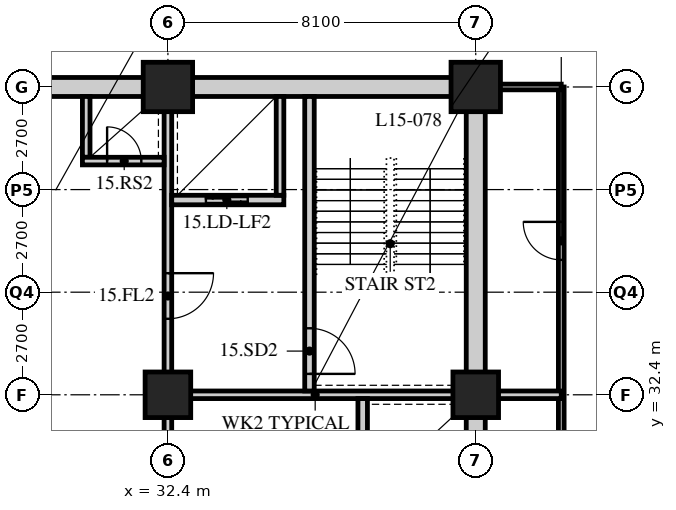
"""IFC4 building model, lengths in metres.
Left out: names, types, materials, properties, quantities, classifications, styles, units other than length and angle.
Written with IfcOpenShell. Run it as: python <this file> out.ifc"""

import sys

from ifc_helpers import new_model, si_unit, direction, frame, frame_2d, origin, origin_2d, place, context, subcontext, project, spatial, rectangle, hollow_rectangle, extrude, element, fill, save


model = new_model("IFC4")
c1 = context("Model", 3, precision=1e-05, world=origin(), true_north=direction((0.0, 1.0)))
c2 = subcontext(c1, "Body", "Model", "MODEL_VIEW")
j1 = project(units=[si_unit("LENGTHUNIT", "METRE"), si_unit("PLANEANGLEUNIT", "RADIAN")], contexts=[c1])
p1 = place(None, origin())
s1 = spatial("IfcSite", under=j1, at=p1, CompositionType="ELEMENT")
p2 = place(p1, origin())
s2 = spatial("IfcBuilding", under=s1, at=p2, CompositionType="ELEMENT")
p3 = place(p2, frame((0.0, 0.0, 63.6)))
s3 = spatial("IfcBuildingStorey", under=s2, at=p3, CompositionType="ELEMENT", Elevation=63.6)
p4 = place(p3, frame((32.4, 32.4, 0.0), z_axis=(0.0, 0.0, 1.0), x_axis=(1.0, 0.0, 0.0)))
e1 = element("IfcColumn", 1, at=p4, inside=s3, PredefinedType="COLUMN", context=c2, shape_type="SweptSolid", body=[
    extrude(hollow_rectangle(XDim=1.2, YDim=1.2, WallThickness=0.12, at=origin_2d()), origin(), (0.0, 0.0, 1.0), 3.4),
])
p5 = place(p3, frame((32.4, 40.5, 0.0), z_axis=(0.0, 0.0, 1.0), x_axis=(1.0, 0.0, 0.0)))
e2 = element("IfcColumn", 2, at=p5, inside=s3, PredefinedType="COLUMN", context=c2, shape_type="SweptSolid", body=[
    extrude(hollow_rectangle(XDim=1.3, YDim=1.3, WallThickness=0.13, at=origin_2d()), origin(), (0.0, 0.0, 1.0), 3.4),
])
p6 = place(p3, frame((40.5, 32.4, 0.0), z_axis=(0.0, 0.0, 1.0), x_axis=(1.0, 0.0, 0.0)))
e3 = element("IfcColumn", 3, at=p6, inside=s3, PredefinedType="COLUMN", context=c2, shape_type="SweptSolid", body=[
    extrude(hollow_rectangle(XDim=1.2, YDim=1.2, WallThickness=0.12, at=origin_2d()), origin(), (0.0, 0.0, 1.0), 3.4),
])
p7 = place(p3, frame((40.5, 40.5, 0.0), z_axis=(0.0, 0.0, 1.0), x_axis=(1.0, 0.0, 0.0)))
e4 = element("IfcColumn", 4, at=p7, inside=s3, PredefinedType="COLUMN", context=c2, shape_type="SweptSolid", body=[
    extrude(hollow_rectangle(XDim=1.3, YDim=1.3, WallThickness=0.13, at=origin_2d()), origin(), (0.0, 0.0, 1.0), 3.4),
])
p8 = place(p3, frame((42.75, 13.95, 0.0), z_axis=(0.0, 0.0, 1.0), x_axis=(0.0, 1.0, 0.0)))
e5 = element("IfcWall", 5, at=p8, inside=s3, PredefinedType="PARTITIONING", context=c2, shape_type="SweptSolid", body=[
    extrude(rectangle(XDim=26.55, YDim=0.15, at=frame_2d((13.275, 0.0))), origin(), (0.0, 0.0, 1.0), 3.19),
])
p9 = place(p8, frame((13.9, 0.0, 0.0)))
e6 = element("IfcOpeningElement", 6, at=p9, cuts=e5, PredefinedType="OPENING", context=c2, shape_type="SweptSolid", body=[
    extrude(rectangle(XDim=1.0, YDim=2.1, at=frame_2d((0.5, 1.05))), frame((0.0, 0.085, 0.0), z_axis=(0.0, -1.0, 0.0), x_axis=(1.0, 0.0, 0.0)), (0.0, 0.0, 1.0), 0.17),
])
p10 = place(p8, frame((22.0, 0.0, 0.0)))
e7 = element("IfcOpeningElement", 7, at=p10, cuts=e5, PredefinedType="OPENING", context=c2, shape_type="SweptSolid", body=[
    extrude(rectangle(XDim=1.0, YDim=2.1, at=frame_2d((0.5, 1.05))), frame((0.0, 0.085, 0.0), z_axis=(0.0, -1.0, 0.0), x_axis=(1.0, 0.0, 0.0)), (0.0, 0.0, 1.0), 0.17),
])
p11 = place(p3, frame((42.75, 40.5, 0.0), z_axis=(0.0, 0.0, 1.0), x_axis=(-1.0, 0.0, 0.0)))
e8 = element("IfcWall", 8, at=p11, inside=s3, PredefinedType="PARTITIONING", context=c2, shape_type="SweptSolid", body=[
    extrude(rectangle(XDim=2.05, YDim=0.15, at=frame_2d((1.025, 0.0))), origin(), (0.0, 0.0, 1.0), 2.578),
])
p12 = place(p3, frame((40.5, 32.4, 0.0), z_axis=(0.0, 0.0, 1.0), x_axis=(1.0, 0.0, 0.0)))
e9 = element("IfcWall", 9, at=p12, inside=s3, PredefinedType="SOLIDWALL", context=c2, shape_type="SweptSolid", body=[
    extrude(rectangle(XDim=2.25, YDim=0.2, at=frame_2d((1.125, 0.0))), origin(), (0.0, 0.0, 1.0), 2.578),
])
p13 = place(p3, frame((15.95, 40.5, 0.0), z_axis=(0.0, 0.0, 1.0), x_axis=(1.0, 0.0, 0.0)))
e10 = element("IfcWall", 10, at=p13, inside=s3, PredefinedType="SOLIDWALL", context=c2, shape_type="SweptSolid", body=[
    extrude(rectangle(XDim=24.8, YDim=0.5, at=frame_2d((12.4, 0.0))), origin(), (0.0, 0.0, 1.0), 2.54),
])
p14 = place(p13, frame((11.5, 0.0, 0.0)))
e11 = element("IfcOpeningElement", 11, at=p14, cuts=e10, PredefinedType="OPENING", context=c2, shape_type="SweptSolid", body=[
    extrude(rectangle(XDim=1.8, YDim=2.4, at=frame_2d((0.9, 1.2))), frame((0.0, 0.26, 0.0), z_axis=(0.0, -1.0, 0.0), x_axis=(1.0, 0.0, 0.0)), (0.0, 0.0, 1.0), 0.52),
])
p15 = place(p3, frame((40.5, 24.55, 0.0), z_axis=(0.0, 0.0, 1.0), x_axis=(0.0, 1.0, 0.0)))
e12 = element("IfcWall", 12, at=p15, inside=s3, PredefinedType="SOLIDWALL", context=c2, shape_type="SweptSolid", body=[
    extrude(rectangle(XDim=15.7, YDim=0.5, at=frame_2d((7.85, 0.0))), origin(), (0.0, 0.0, 1.0), 2.578),
])
p16 = place(p3, frame((32.3, 32.4, 0.0), z_axis=(0.0, 0.0, 1.0), x_axis=(1.0, 0.0, 0.0)))
e13 = element("IfcWall", 13, at=p16, inside=s3, PredefinedType="SOLIDWALL", context=c2, shape_type="SweptSolid", body=[
    extrude(rectangle(XDim=7.95, YDim=0.2, at=frame_2d((3.975, 0.0))), origin(), (0.0, 0.0, 1.0), 2.578),
])
p17 = place(p3, frame((32.4, 32.5, 0.0), z_axis=(0.0, 0.0, 1.0), x_axis=(0.0, 1.0, 0.0)))
e14 = element("IfcWall", 14, at=p17, inside=s3, PredefinedType="SOLIDWALL", context=c2, shape_type="SweptSolid", body=[
    extrude(rectangle(XDim=7.75, YDim=0.2, at=frame_2d((3.875, 0.0))), origin(), (0.0, 0.0, 1.0), 2.578),
])
p18 = place(p17, frame((1.9, 0.0, 0.0)))
e15 = element("IfcOpeningElement", 15, at=p18, cuts=e14, PredefinedType="OPENING", context=c2, shape_type="SweptSolid", body=[
    extrude(rectangle(XDim=1.2, YDim=2.1, at=frame_2d((0.6, 1.05))), frame((0.0, 0.11, 0.0), z_axis=(0.0, -1.0, 0.0), x_axis=(1.0, 0.0, 0.0)), (0.0, 0.0, 1.0), 0.22),
])
p19 = place(p3, frame((37.525, 24.55, 0.0), z_axis=(0.0, 0.0, 1.0), x_axis=(0.0, 1.0, 0.0)))
e16 = element("IfcWall", 16, at=p19, inside=s3, PredefinedType="SOLIDWALL", context=c2, shape_type="SweptSolid", body=[
    extrude(rectangle(XDim=7.75, YDim=0.25, at=frame_2d((3.875, 0.0))), origin(), (0.0, 0.0, 1.0), 3.19),
])
p20 = place(p3, frame((36.125, 32.5, 0.0), z_axis=(0.0, 0.0, 1.0), x_axis=(0.0, 1.0, 0.0)))
e17 = element("IfcWall", 17, at=p20, inside=s3, PredefinedType="SOLIDWALL", context=c2, shape_type="SweptSolid", body=[
    extrude(rectangle(XDim=7.75, YDim=0.25, at=frame_2d((3.875, 0.0))), origin(), (0.0, 0.0, 1.0), 3.19),
])
p21 = place(p20, frame((0.45, 0.0, 0.0)))
e18 = element("IfcOpeningElement", 18, at=p21, cuts=e17, PredefinedType="OPENING", context=c2, shape_type="SweptSolid", body=[
    extrude(rectangle(XDim=1.2, YDim=2.1, at=frame_2d((0.6, 1.05))), frame((0.0, 0.135, 0.0), z_axis=(0.0, -1.0, 0.0), x_axis=(1.0, 0.0, 0.0)), (0.0, 0.0, 1.0), 0.27),
])
p22 = place(p3, frame((32.5, 37.525, 0.0), z_axis=(0.0, 0.0, 1.0), x_axis=(1.0, 0.0, 0.0)))
e19 = element("IfcWall", 19, at=p22, inside=s3, PredefinedType="SOLIDWALL", context=c2, shape_type="SweptSolid", body=[
    extrude(rectangle(XDim=2.95, YDim=0.25, at=frame_2d((1.475, 0.0))), origin(), (0.0, 0.0, 1.0), 3.19),
])
p23 = place(p22, frame((0.9, 0.0, 0.0)))
e20 = element("IfcOpeningElement", 20, at=p23, cuts=e19, PredefinedType="OPENING", context=c2, shape_type="SweptSolid", body=[
    extrude(rectangle(XDim=1.1, YDim=2.4, at=frame_2d((0.55, 1.2))), frame((0.0, 0.135, 0.0), z_axis=(0.0, -1.0, 0.0), x_axis=(1.0, 0.0, 0.0)), (0.0, 0.0, 1.0), 0.27),
])
p24 = place(p3, frame((35.35, 37.65, 0.0), z_axis=(0.0, 0.0, 1.0), x_axis=(0.0, 1.0, 0.0)))
e21 = element("IfcWall", 21, at=p24, inside=s3, PredefinedType="SOLIDWALL", context=c2, shape_type="SweptSolid", body=[
    extrude(rectangle(XDim=2.6, YDim=0.2, at=frame_2d((1.3, 0.0))), origin(), (0.0, 0.0, 1.0), 3.19),
])
p25 = place(p3, frame((30.25, 38.65, 0.0), z_axis=(0.0, 0.0, 1.0), x_axis=(0.0, 1.0, 0.0)))
e22 = element("IfcWall", 22, at=p25, inside=s3, PredefinedType="SOLIDWALL", context=c2, shape_type="SweptSolid", body=[
    extrude(rectangle(XDim=1.6, YDim=0.2, at=frame_2d((0.8, 0.0))), origin(), (0.0, 0.0, 1.0), 3.19),
])
p26 = place(p3, frame((30.15, 38.55, 0.0), z_axis=(0.0, 0.0, 1.0), x_axis=(1.0, 0.0, 0.0)))
e23 = element("IfcWall", 23, at=p26, inside=s3, PredefinedType="SOLIDWALL", context=c2, shape_type="SweptSolid", body=[
    extrude(rectangle(XDim=2.15, YDim=0.2, at=frame_2d((1.075, 0.0))), origin(), (0.0, 0.0, 1.0), 3.19),
])
p27 = place(p26, frame((0.65, 0.0, 0.0)))
e24 = element("IfcOpeningElement", 24, at=p27, cuts=e23, PredefinedType="OPENING", context=c2, shape_type="SweptSolid", body=[
    extrude(rectangle(XDim=0.9, YDim=2.1, at=frame_2d((0.45, 1.05))), frame((0.0, 0.11, 0.0), z_axis=(0.0, -1.0, 0.0), x_axis=(1.0, 0.0, 0.0)), (0.0, 0.0, 1.0), 0.22),
])
p28 = place(p3, frame((32.4, 24.55, 0.0), z_axis=(0.0, 0.0, 1.0), x_axis=(0.0, 1.0, 0.0)))
e25 = element("IfcWall", 25, at=p28, inside=s3, PredefinedType="PARTITIONING", context=c2, shape_type="SweptSolid", body=[
    extrude(rectangle(XDim=7.75, YDim=0.2, at=frame_2d((3.875, 0.0))), origin(), (0.0, 0.0, 1.0), 2.578),
])
p29 = place(p28, frame((0.925, 0.0, 0.0)))
e26 = element("IfcOpeningElement", 26, at=p29, cuts=e25, PredefinedType="OPENING", context=c2, shape_type="SweptSolid", body=[
    extrude(rectangle(XDim=0.9, YDim=2.1, at=frame_2d((0.45, 1.05))), frame((0.0, 0.11, 0.0), z_axis=(0.0, -1.0, 0.0), x_axis=(1.0, 0.0, 0.0)), (0.0, 0.0, 1.0), 0.22),
])
p30 = place(p28, frame((3.275, 0.0, 0.0)))
e27 = element("IfcOpeningElement", 27, at=p30, cuts=e25, PredefinedType="OPENING", context=c2, shape_type="SweptSolid", body=[
    extrude(rectangle(XDim=1.0, YDim=2.1, at=frame_2d((0.5, 1.05))), frame((0.0, 0.11, 0.0), z_axis=(0.0, -1.0, 0.0), x_axis=(1.0, 0.0, 0.0)), (0.0, 0.0, 1.0), 0.22),
])
p31 = place(p28, frame((5.775, 0.0, 0.0)))
e28 = element("IfcOpeningElement", 28, at=p31, cuts=e25, PredefinedType="OPENING", context=c2, shape_type="SweptSolid", body=[
    extrude(rectangle(XDim=1.0, YDim=2.1, at=frame_2d((0.5, 1.05))), frame((0.0, 0.11, 0.0), z_axis=(0.0, -1.0, 0.0), x_axis=(1.0, 0.0, 0.0)), (0.0, 0.0, 1.0), 0.22),
])
p32 = place(p10, origin())
e29 = element("IfcDoor", 29, at=p32, inside=s3, OperationType="SINGLE_SWING_RIGHT", PredefinedType="DOOR", context=c2, shape_type="SweptSolid", body=[
    extrude(rectangle(XDim=1.0, YDim=2.1, at=frame_2d((0.5, 1.05))), frame((0.0, 0.025, 0.0), z_axis=(0.0, -1.0, 0.0), x_axis=(1.0, 0.0, 0.0)), (0.0, 0.0, 1.0), 0.05),
])
fill(e7, e29)
p33 = place(p21, origin())
e30 = element("IfcDoor", 30, at=p33, inside=s3, OperationType="SINGLE_SWING_RIGHT", PredefinedType="DOOR", context=c2, shape_type="SweptSolid", body=[
    extrude(rectangle(XDim=1.2, YDim=2.1, at=frame_2d((0.6, 1.05))), frame((0.0, 0.025, 0.0), z_axis=(0.0, -1.0, 0.0), x_axis=(1.0, 0.0, 0.0)), (0.0, 0.0, 1.0), 0.05),
])
fill(e18, e30)
p34 = place(p18, origin())
e31 = element("IfcDoor", 31, at=p34, inside=s3, OperationType="SINGLE_SWING_LEFT", PredefinedType="DOOR", context=c2, shape_type="SweptSolid", body=[
    extrude(rectangle(XDim=1.2, YDim=2.1, at=frame_2d((0.6, 1.05))), frame((0.0, 0.025, 0.0), z_axis=(0.0, -1.0, 0.0), x_axis=(1.0, 0.0, 0.0)), (0.0, 0.0, 1.0), 0.05),
])
fill(e15, e31)
p35 = place(p27, origin())
e32 = element("IfcDoor", 32, at=p35, inside=s3, OperationType="SINGLE_SWING_LEFT", PredefinedType="DOOR", context=c2, shape_type="SweptSolid", body=[
    extrude(rectangle(XDim=0.9, YDim=2.1, at=frame_2d((0.45, 1.05))), frame((0.0, 0.025, 0.0), z_axis=(0.0, -1.0, 0.0), x_axis=(1.0, 0.0, 0.0)), (0.0, 0.0, 1.0), 0.05),
])
fill(e24, e32)
p36 = place(p23, origin())
e33 = element("IfcDoor", 33, at=p36, inside=s3, OperationType="DOUBLE_DOOR_SLIDING", PredefinedType="DOOR", context=c2, shape_type="SweptSolid", body=[
    extrude(rectangle(XDim=1.1, YDim=2.4, at=frame_2d((0.55, 1.2))), frame((0.0, 0.025, 0.0), z_axis=(0.0, -1.0, 0.0), x_axis=(1.0, 0.0, 0.0)), (0.0, 0.0, 1.0), 0.05),
])
fill(e20, e33)
save(model, sys.argv[1])
